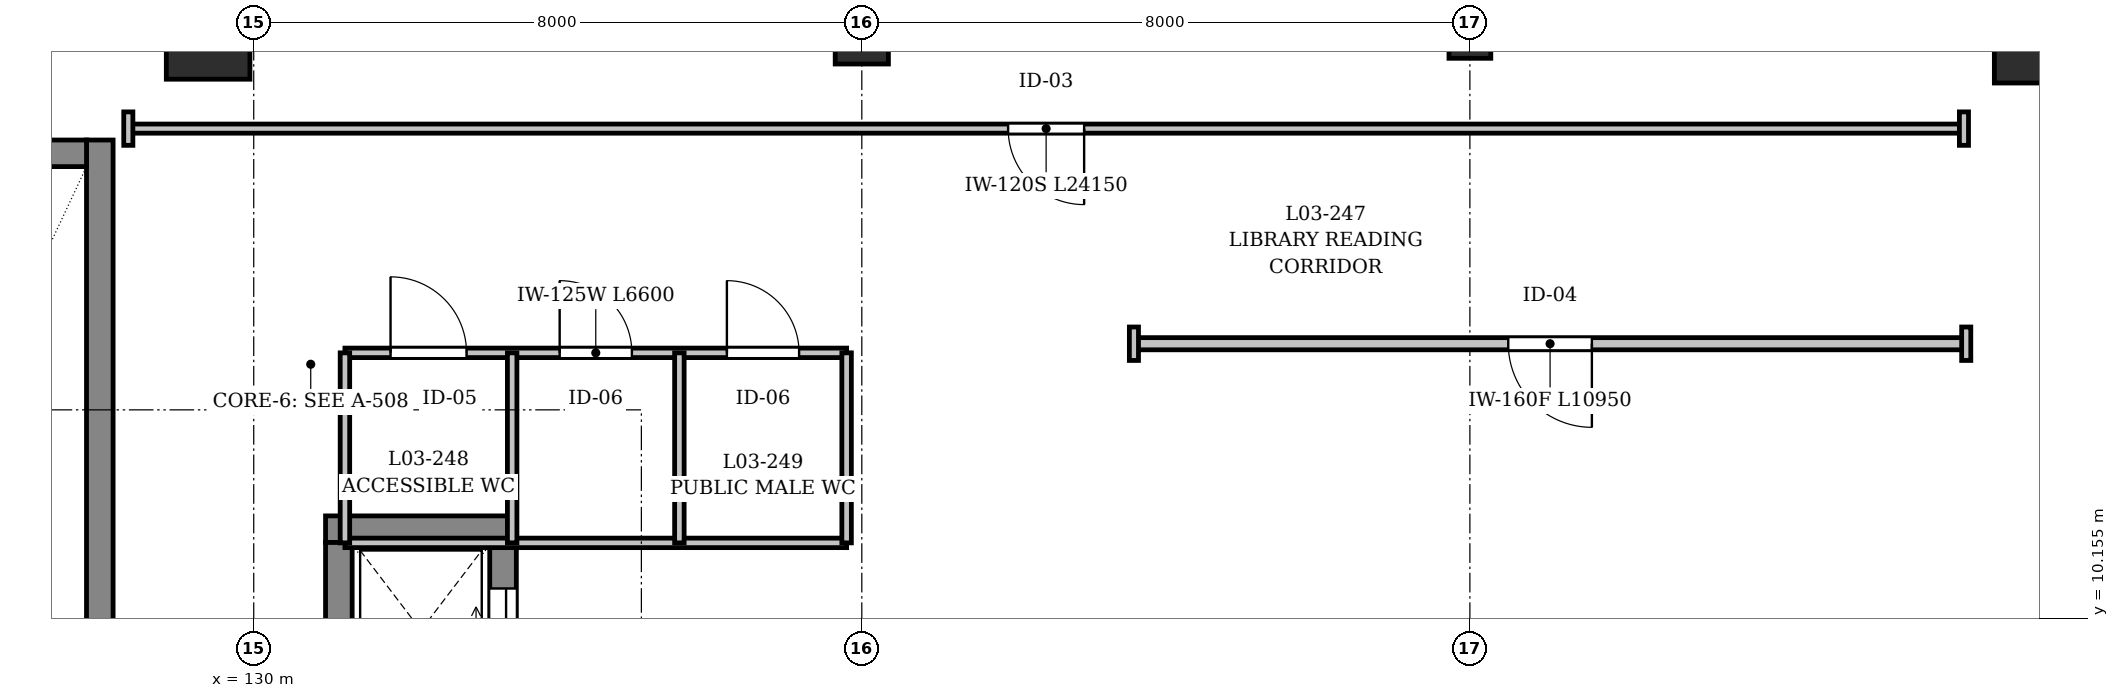
"""IFC4 building model, lengths in metres.
Left out: names, types, materials, properties, quantities, classifications, styles, units other than length and angle.
Written with IfcOpenShell. Run it as: python <this file> out.ifc"""

import sys

from ifc_helpers import new_model, si_unit, direction, frame, frame_2d, origin, origin_2d, place, context, subcontext, project, spatial, rectangle, extrude, element, fill, save


model = new_model("IFC4")
c1 = context("Model", 3, precision=1e-05, world=origin(), true_north=direction((0.0, 1.0)))
c2 = subcontext(c1, "Body", "Model", "MODEL_VIEW")
j1 = project(units=[si_unit("LENGTHUNIT", "METRE"), si_unit("PLANEANGLEUNIT", "RADIAN")], contexts=[c1])
p1 = place(None, origin())
s1 = spatial("IfcSite", under=j1, at=p1, CompositionType="ELEMENT")
p2 = place(p1, origin())
s2 = spatial("IfcBuilding", under=s1, at=p2, CompositionType="ELEMENT")
p3 = place(p2, frame((0.0, 0.0, 10.2)))
s3 = spatial("IfcBuildingStorey", under=s2, at=p3, CompositionType="ELEMENT", Elevation=10.2)
p4 = place(p3, frame((129.4, 17.8, 0.0), z_axis=(0.0, 0.0, 1.0), x_axis=(1.0, 0.0, 0.0)))
e1 = element("IfcColumn", 1, at=p4, inside=s3, PredefinedType="COLUMN", context=c2, shape_type="SweptSolid", body=[
    extrude(rectangle(XDim=1.1, YDim=1.1, at=origin_2d()), origin(), (0.0, 0.0, 1.0), 4.54),
])
p5 = place(p3, frame((138.0, 17.8, 0.0), z_axis=(0.0, 0.0, 1.0), x_axis=(1.0, 0.0, 0.0)))
e2 = element("IfcColumn", 2, at=p5, inside=s3, PredefinedType="COLUMN", context=c2, shape_type="SweptSolid", body=[
    extrude(rectangle(XDim=0.7, YDim=0.7, at=origin_2d()), origin(), (0.0, 0.0, 1.0), 4.54),
])
p6 = place(p3, frame((146.0, 17.8, 0.0), z_axis=(0.0, 0.0, 1.0), x_axis=(1.0, 0.0, 0.0)))
e3 = element("IfcColumn", 3, at=p6, inside=s3, PredefinedType="COLUMN", context=c2, shape_type="SweptSolid", body=[
    extrude(rectangle(XDim=0.55, YDim=0.55, at=origin_2d()), origin(), (0.0, 0.0, 1.0), 4.54),
])
p7 = place(p3, frame((153.3, 17.8, 0.0), z_axis=(0.0, 0.0, 1.0), x_axis=(1.0, 0.0, 0.0)))
e4 = element("IfcColumn", 4, at=p7, inside=s3, PredefinedType="COLUMN", context=c2, shape_type="SweptSolid", body=[
    extrude(rectangle(XDim=0.8, YDim=1.2, at=origin_2d()), origin(), (0.0, 0.0, 1.0), 4.54),
])
p8 = place(p3, frame((127.975, 7.15, 0.0), z_axis=(0.0, 0.0, 1.0), x_axis=(0.0, 1.0, 0.0)))
e5 = element("IfcWall", 5, at=p8, inside=s3, PredefinedType="SHEAR", context=c2, shape_type="SweptSolid", body=[
    extrude(rectangle(XDim=9.3, YDim=0.35, at=frame_2d((4.65, 0.0))), origin(), (0.0, 0.0, 1.0), 3.6),
])
p9 = place(p3, frame((127.8, 16.275, 0.0), z_axis=(0.0, 0.0, 1.0), x_axis=(-1.0, 0.0, 0.0)))
e6 = element("IfcWall", 6, at=p9, inside=s3, PredefinedType="SHEAR", context=c2, shape_type="SweptSolid", body=[
    extrude(rectangle(XDim=3.3, YDim=0.35, at=frame_2d((1.65, 0.0))), origin(), (0.0, 0.0, 1.0), 3.6),
])
p10 = place(p3, frame((133.28, 8.845, 0.0), z_axis=(0.0, 0.0, 1.0), x_axis=(0.0, 1.0, 0.0)))
e7 = element("IfcWall", 7, at=p10, inside=s3, PredefinedType="SHEAR", context=c2, shape_type="SweptSolid", body=[
    extrude(rectangle(XDim=2.31, YDim=0.35, at=frame_2d((1.155, 0.0))), origin(), (0.0, 0.0, 1.0), 3.6),
])
p11 = place(p10, frame((0.605, 0.0, 0.0)))
e8 = element("IfcOpeningElement", 8, at=p11, cuts=e7, PredefinedType="OPENING", context=c2, shape_type="SweptSolid", body=[
    extrude(rectangle(XDim=1.1, YDim=2.2, at=frame_2d((0.55, 1.1))), frame((0.0, 0.185, 0.0), z_axis=(0.0, -1.0, 0.0), x_axis=(1.0, 0.0, 0.0)), (0.0, 0.0, 1.0), 0.37),
])
p12 = place(p3, frame((133.455, 11.33, 0.0), z_axis=(0.0, 0.0, 1.0), x_axis=(-1.0, 0.0, 0.0)))
e9 = element("IfcWall", 9, at=p12, inside=s3, PredefinedType="SHEAR", context=c2, shape_type="SweptSolid", body=[
    extrude(rectangle(XDim=2.51, YDim=0.35, at=frame_2d((1.255, 0.0))), origin(), (0.0, 0.0, 1.0), 3.6),
])
p13 = place(p3, frame((131.12, 11.155, 0.0), z_axis=(0.0, 0.0, 1.0), x_axis=(0.0, -1.0, 0.0)))
e10 = element("IfcWall", 10, at=p13, inside=s3, PredefinedType="SHEAR", context=c2, shape_type="SweptSolid", body=[
    extrude(rectangle(XDim=2.31, YDim=0.35, at=frame_2d((1.155, 0.0))), origin(), (0.0, 0.0, 1.0), 3.6),
])
p14 = place(p3, frame((131.2, 13.65, 0.0), z_axis=(0.0, 0.0, 1.0), x_axis=(1.0, 0.0, 0.0)))
e11 = element("IfcWall", 11, at=p14, inside=s3, PredefinedType="PARTITIONING", context=c2, shape_type="SweptSolid", body=[
    extrude(rectangle(XDim=6.6, YDim=0.125, at=frame_2d((3.3, 0.0))), origin(), (0.0, 0.0, 1.0), 3.55),
])
p15 = place(p14, frame((0.6, 0.0, 0.0)))
e12 = element("IfcOpeningElement", 12, at=p15, cuts=e11, PredefinedType="OPENING", context=c2, shape_type="SweptSolid", body=[
    extrude(rectangle(XDim=1.0, YDim=2.2, at=frame_2d((0.5, 1.1))), frame((0.0, 0.073, 0.0), z_axis=(0.0, -1.0, 0.0), x_axis=(1.0, 0.0, 0.0)), (0.0, 0.0, 1.0), 0.145),
])
p16 = place(p14, frame((2.825, 0.0, 0.0)))
e13 = element("IfcOpeningElement", 13, at=p16, cuts=e11, PredefinedType="OPENING", context=c2, shape_type="SweptSolid", body=[
    extrude(rectangle(XDim=0.95, YDim=2.2, at=frame_2d((0.475, 1.1))), frame((0.0, 0.073, 0.0), z_axis=(0.0, -1.0, 0.0), x_axis=(1.0, 0.0, 0.0)), (0.0, 0.0, 1.0), 0.145),
])
p17 = place(p14, frame((5.025, 0.0, 0.0)))
e14 = element("IfcOpeningElement", 14, at=p17, cuts=e11, PredefinedType="OPENING", context=c2, shape_type="SweptSolid", body=[
    extrude(rectangle(XDim=0.95, YDim=2.2, at=frame_2d((0.475, 1.1))), frame((0.0, 0.073, 0.0), z_axis=(0.0, -1.0, 0.0), x_axis=(1.0, 0.0, 0.0)), (0.0, 0.0, 1.0), 0.145),
])
p18 = place(p3, frame((131.2, 11.15, 0.0), z_axis=(0.0, 0.0, 1.0), x_axis=(1.0, 0.0, 0.0)))
e15 = element("IfcWall", 15, at=p18, inside=s3, PredefinedType="PARTITIONING", context=c2, shape_type="SweptSolid", body=[
    extrude(rectangle(XDim=6.6, YDim=0.125, at=frame_2d((3.3, 0.0))), origin(), (0.0, 0.0, 1.0), 3.55),
])
for number, where, z_axis, x_axis in (
    (16, (131.2, 11.15, 0.0), (0.0, 0.0, 1.0), (0.0, 1.0, 0.0)),
    (17, (137.8, 11.15, 0.0), (0.0, 0.0, 1.0), (0.0, 1.0, 0.0)),
    (18, (133.4, 11.15, 0.0), (0.0, 0.0, 1.0), (0.0, 1.0, 0.0)),
    (19, (135.6, 11.15, 0.0), (0.0, 0.0, 1.0), (0.0, 1.0, 0.0)),
):
    element("IfcWall", number, at=place(p3, frame(where, z_axis=z_axis, x_axis=x_axis)), inside=s3, PredefinedType="PARTITIONING", context=c2, shape_type="SweptSolid", body=[
        extrude(rectangle(XDim=2.5, YDim=0.125, at=frame_2d((1.25, 0.0))), origin(), (0.0, 0.0, 1.0), 3.55),
    ])
p19 = place(p3, frame((152.5, 16.6, 0.0), z_axis=(0.0, 0.0, 1.0), x_axis=(-1.0, 0.0, 0.0)))
e20 = element("IfcWall", 20, at=p19, inside=s3, PredefinedType="PARTITIONING", context=c2, shape_type="SweptSolid", body=[
    extrude(rectangle(XDim=24.15, YDim=0.12, at=frame_2d((12.075, 0.0))), origin(), (0.0, 0.0, 1.0), 3.55),
])
p20 = place(p19, frame((11.575, 0.0, 0.0)))
e21 = element("IfcOpeningElement", 21, at=p20, cuts=e20, PredefinedType="OPENING", context=c2, shape_type="SweptSolid", body=[
    extrude(rectangle(XDim=1.0, YDim=2.2, at=frame_2d((0.5, 1.1))), frame((0.0, 0.07, 0.0), z_axis=(0.0, -1.0, 0.0), x_axis=(1.0, 0.0, 0.0)), (0.0, 0.0, 1.0), 0.14),
])
p21 = place(p3, frame((152.53, 13.77, 0.0), z_axis=(0.0, 0.0, 1.0), x_axis=(-1.0, 0.0, 0.0)))
e22 = element("IfcWall", 22, at=p21, inside=s3, PredefinedType="PARTITIONING", context=c2, shape_type="SweptSolid", body=[
    extrude(rectangle(XDim=10.95, YDim=0.16, at=frame_2d((5.475, 0.0))), origin(), (0.0, 0.0, 1.0), 3.55),
])
p22 = place(p21, frame((4.925, 0.0, 0.0)))
e23 = element("IfcOpeningElement", 23, at=p22, cuts=e22, PredefinedType="OPENING", context=c2, shape_type="SweptSolid", body=[
    extrude(rectangle(XDim=1.1, YDim=2.2, at=frame_2d((0.55, 1.1))), frame((0.0, 0.09, 0.0), z_axis=(0.0, -1.0, 0.0), x_axis=(1.0, 0.0, 0.0)), (0.0, 0.0, 1.0), 0.18),
])
for number, where, z_axis, x_axis in (
    (24, (152.5, 16.82, 0.0), (0.0, 0.0, 1.0), (0.0, -1.0, 0.0)),
    (25, (128.35, 16.82, 0.0), (0.0, 0.0, 1.0), (0.0, -1.0, 0.0)),
):
    element("IfcWall", number, at=place(p3, frame(where, z_axis=z_axis, x_axis=x_axis)), inside=s3, PredefinedType="PARTITIONING", context=c2, shape_type="SweptSolid", body=[
        extrude(rectangle(XDim=0.44, YDim=0.12, at=frame_2d((0.22, 0.0))), origin(), (0.0, 0.0, 1.0), 3.55),
    ])
for number, where, z_axis, x_axis in (
    (26, (152.53, 13.99, 0.0), (0.0, 0.0, 1.0), (0.0, -1.0, 0.0)),
    (27, (141.58, 13.99, 0.0), (0.0, 0.0, 1.0), (0.0, -1.0, 0.0)),
):
    element("IfcWall", number, at=place(p3, frame(where, z_axis=z_axis, x_axis=x_axis)), inside=s3, PredefinedType="PARTITIONING", context=c2, shape_type="SweptSolid", body=[
        extrude(rectangle(XDim=0.44, YDim=0.12, at=frame_2d((0.22, 0.0))), origin(), (0.0, 0.0, 1.0), 3.55),
    ])
p23 = place(p11, origin())
e28 = element("IfcDoor", 28, at=p23, inside=s3, OperationType="SLIDING_TO_LEFT", PredefinedType="DOOR", context=c2, shape_type="SweptSolid", body=[
    extrude(rectangle(XDim=1.1, YDim=2.2, at=frame_2d((0.55, 1.1))), frame((0.0, 0.025, 0.0), z_axis=(0.0, -1.0, 0.0), x_axis=(1.0, 0.0, 0.0)), (0.0, 0.0, 1.0), 0.05),
])
fill(e8, e28)
p24 = place(p15, origin())
e29 = element("IfcDoor", 29, at=p24, inside=s3, OperationType="SINGLE_SWING_LEFT", PredefinedType="DOOR", context=c2, shape_type="SweptSolid", body=[
    extrude(rectangle(XDim=1.0, YDim=2.2, at=frame_2d((0.5, 1.1))), frame((0.0, 0.025, 0.0), z_axis=(0.0, -1.0, 0.0), x_axis=(1.0, 0.0, 0.0)), (0.0, 0.0, 1.0), 0.05),
])
fill(e12, e29)
p25 = place(p16, origin())
e30 = element("IfcDoor", 30, at=p25, inside=s3, OperationType="SINGLE_SWING_RIGHT", PredefinedType="DOOR", context=c2, shape_type="SweptSolid", body=[
    extrude(rectangle(XDim=0.95, YDim=2.2, at=frame_2d((0.475, 1.1))), frame((0.0, 0.025, 0.0), z_axis=(0.0, -1.0, 0.0), x_axis=(1.0, 0.0, 0.0)), (0.0, 0.0, 1.0), 0.05),
])
fill(e13, e30)
p26 = place(p17, origin())
e31 = element("IfcDoor", 31, at=p26, inside=s3, OperationType="SINGLE_SWING_LEFT", PredefinedType="DOOR", context=c2, shape_type="SweptSolid", body=[
    extrude(rectangle(XDim=0.95, YDim=2.2, at=frame_2d((0.475, 1.1))), frame((0.0, 0.025, 0.0), z_axis=(0.0, -1.0, 0.0), x_axis=(1.0, 0.0, 0.0)), (0.0, 0.0, 1.0), 0.05),
])
fill(e14, e31)
p27 = place(p20, origin())
e32 = element("IfcDoor", 32, at=p27, inside=s3, OperationType="SINGLE_SWING_RIGHT", PredefinedType="DOOR", context=c2, shape_type="SweptSolid", body=[
    extrude(rectangle(XDim=1.0, YDim=2.2, at=frame_2d((0.5, 1.1))), frame((0.0, 0.025, 0.0), z_axis=(0.0, -1.0, 0.0), x_axis=(1.0, 0.0, 0.0)), (0.0, 0.0, 1.0), 0.05),
])
fill(e21, e32)
p28 = place(p22, origin())
e33 = element("IfcDoor", 33, at=p28, inside=s3, OperationType="SINGLE_SWING_RIGHT", PredefinedType="DOOR", context=c2, shape_type="SweptSolid", body=[
    extrude(rectangle(XDim=1.1, YDim=2.2, at=frame_2d((0.55, 1.1))), frame((0.0, 0.025, 0.0), z_axis=(0.0, -1.0, 0.0), x_axis=(1.0, 0.0, 0.0)), (0.0, 0.0, 1.0), 0.05),
])
fill(e23, e33)
save(model, sys.argv[1])
